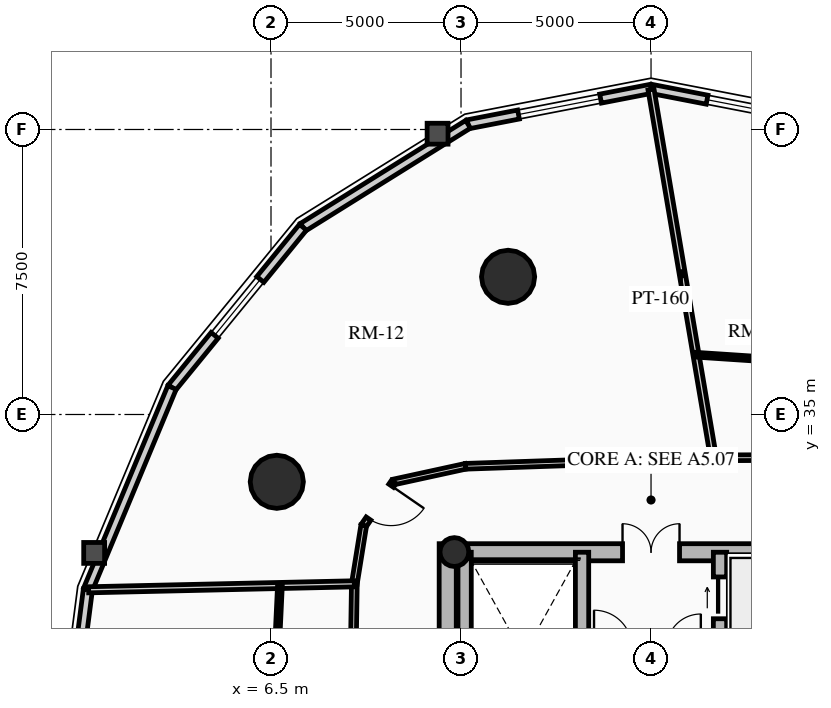
"""IFC4 building model, lengths in metres.
Left out: names, types, materials, properties, quantities, classifications, styles, units other than length and angle.
Written with IfcOpenShell. Run it as: python <this file> out.ifc"""

import sys

from ifc_helpers import new_model, si_unit, direction, frame, frame_2d, origin, origin_2d, place, context, subcontext, project, spatial, rectangle, circle, hollow_circle, extrude, source, transform, mapped, element, fill, save


model = new_model("IFC4")
c1 = context("Model", 3, precision=1e-05, world=origin(), true_north=direction((0.0, 1.0)))
c2 = subcontext(c1, "Body", "Model", "MODEL_VIEW")
j1 = project(units=[si_unit("LENGTHUNIT", "METRE"), si_unit("PLANEANGLEUNIT", "RADIAN")], contexts=[c1])
p1 = place(None, origin())
s1 = spatial("IfcSite", under=j1, at=p1, CompositionType="ELEMENT")
p2 = place(p1, origin())
s2 = spatial("IfcBuilding", under=s1, at=p2, CompositionType="ELEMENT")
p3 = place(p2, frame((0.0, 0.0, 107.98)))
s3 = spatial("IfcBuildingStorey", under=s2, at=p3, CompositionType="ELEMENT", Elevation=107.98)
p4 = place(p3, frame((11.15, 17.4, 0.0), z_axis=(0.0, 0.0, 1.0), x_axis=(0.0, 1.0, 0.0)))
e1 = element("IfcWall", 1, at=p4, inside=s3, PredefinedType="SHEAR", context=c2, shape_type="SweptSolid", body=[
    extrude(rectangle(XDim=14.2, YDim=0.45, at=frame_2d((7.1, 0.0))), origin(), (0.0, 0.0, 1.0), 2.91),
])
p5 = place(p3, frame((11.15, 31.375, 0.0), z_axis=(0.0, 0.0, 1.0), x_axis=(1.0, 0.0, 0.0)))
e2 = element("IfcWall", 2, at=p5, inside=s3, PredefinedType="SHEAR", context=c2, shape_type="SweptSolid", body=[
    extrude(rectangle(XDim=10.7, YDim=0.45, at=frame_2d((5.35, 0.0))), origin(), (0.0, 0.0, 1.0), 2.91),
])
m1 = source(origin(), c2, "Body", "SweptSolid", [
    extrude(rectangle(XDim=1.5, YDim=2.02, at=frame_2d((0.75, 1.01))), frame((0.0, 0.235, 0.0), z_axis=(0.0, -1.0, 0.0), x_axis=(1.0, 0.0, 0.0)), (0.0, 0.0, 1.0), 0.47),
])
p6 = place(p5, frame((4.6, 0.0, 0.0)))
e3 = element("IfcOpeningElement", 3, at=p6, cuts=e2, PredefinedType="OPENING", context=c2, shape_type="MappedRepresentation", body=[
    mapped(m1, transform((0.0, 0.0, 0.0), x_axis=(1.0, 0.0, 0.0), y_axis=(0.0, 1.0, 0.0), z_axis=(0.0, 0.0, 1.0), scale=1.0)),
])
p7 = place(p3, frame((14.685, 17.625, 0.0), z_axis=(0.0, 0.0, 1.0), x_axis=(0.0, 1.0, 0.0)))
e4 = element("IfcWall", 4, at=p7, inside=s3, PredefinedType="SHEAR", context=c2, shape_type="SweptSolid", body=[
    extrude(rectangle(XDim=13.75, YDim=0.35, at=frame_2d((6.875, 0.0))), origin(), (0.0, 0.0, 1.0), 2.91),
])
m2 = source(origin(), c2, "Body", "SweptSolid", [
    extrude(rectangle(XDim=1.1, YDim=2.015, at=frame_2d((0.55, 1.007))), frame((0.0, 0.185, 0.0), z_axis=(0.0, -1.0, 0.0), x_axis=(1.0, 0.0, 0.0)), (0.0, 0.0, 1.0), 0.37),
])
p8 = place(p7, frame((4.875, 0.0, 0.0)))
e5 = element("IfcOpeningElement", 5, at=p8, cuts=e4, PredefinedType="OPENING", context=c2, shape_type="MappedRepresentation", body=[
    mapped(m2, transform((0.0, 0.0, 0.0), x_axis=(1.0, 0.0, 0.0), y_axis=(0.0, 1.0, 0.0), z_axis=(0.0, 0.0, 1.0), scale=1.0)),
])
m3 = source(origin(), c2, "Body", "SweptSolid", [
    extrude(rectangle(XDim=1.15, YDim=2.02, at=frame_2d((0.575, 1.01))), frame((0.0, 0.185, 0.0), z_axis=(0.0, -1.0, 0.0), x_axis=(1.0, 0.0, 0.0)), (0.0, 0.0, 1.0), 0.37),
])
p9 = place(p7, frame((7.295, 0.0, 0.0)))
e6 = element("IfcOpeningElement", 6, at=p9, cuts=e4, PredefinedType="OPENING", context=c2, shape_type="MappedRepresentation", body=[
    mapped(m3, transform((0.0, 0.0, 0.0), x_axis=(1.0, 0.0, 0.0), y_axis=(0.0, 1.0, 0.0), z_axis=(0.0, 0.0, 1.0), scale=1.0)),
])
p10 = place(p3, frame((18.315, 17.625, 0.0), z_axis=(0.0, 0.0, 1.0), x_axis=(0.0, 1.0, 0.0)))
e7 = element("IfcWall", 7, at=p10, inside=s3, PredefinedType="SHEAR", context=c2, shape_type="SweptSolid", body=[
    extrude(rectangle(XDim=13.75, YDim=0.35, at=frame_2d((6.875, 0.0))), origin(), (0.0, 0.0, 1.0), 2.91),
])
p11 = place(p10, frame((10.0, 0.0, 0.0)))
e8 = element("IfcOpeningElement", 8, at=p11, cuts=e7, PredefinedType="OPENING", context=c2, shape_type="MappedRepresentation", body=[
    mapped(m2, transform((0.0, 0.0, 0.0), x_axis=(1.0, 0.0, 0.0), y_axis=(0.0, 1.0, 0.0), z_axis=(0.0, 0.0, 1.0), scale=1.0)),
])
p12 = place(p10, frame((12.0, 0.0, 0.0)))
e9 = element("IfcOpeningElement", 9, at=p12, cuts=e7, PredefinedType="OPENING", context=c2, shape_type="MappedRepresentation", body=[
    mapped(m2, transform((0.0, 0.0, 0.0), x_axis=(1.0, 0.0, 0.0), y_axis=(0.0, 1.0, 0.0), z_axis=(0.0, 0.0, 1.0), scale=1.0)),
])
p13 = place(p10, frame((5.305, 0.0, 0.0)))
e10 = element("IfcOpeningElement", 10, at=p13, cuts=e7, PredefinedType="OPENING", context=c2, shape_type="MappedRepresentation", body=[
    mapped(m3, transform((0.0, 0.0, 0.0), x_axis=(1.0, 0.0, 0.0), y_axis=(0.0, 1.0, 0.0), z_axis=(0.0, 0.0, 1.0), scale=1.0)),
])
p14 = place(p3, frame((11.595, 24.655, 0.0), z_axis=(0.0, 0.0, 1.0), x_axis=(0.0, 1.0, 0.0)))
e11 = element("IfcWall", 11, at=p14, inside=s3, PredefinedType="SHEAR", context=c2, shape_type="SweptSolid", body=[
    extrude(rectangle(XDim=6.72, YDim=0.35, at=frame_2d((3.36, 0.0))), origin(), (0.0, 0.0, 1.0), 2.91),
])
p15 = place(p3, frame((11.325, 31.38, 0.0), z_axis=(0.0, 0.0, 1.0), x_axis=(1.0, 0.0, 0.0)))
e12 = element("IfcColumn", 12, at=p15, inside=s3, PredefinedType="COLUMN", context=c2, shape_type="SweptSolid", body=[
    extrude(hollow_circle(Radius=0.38, WallThickness=0.032, at=origin_2d()), origin(), (0.0, 0.0, 1.0), 2.91),
])
for number, where, z_axis, x_axis in (
    (13, (12.739, 38.623, 0.0), (0.0, 0.0, 1.0), (1.0, 0.0, 0.0)),
    (14, (6.653, 33.229, 0.0), (0.0, 0.0, 1.0), (1.0, 0.0, 0.0)),
):
    element("IfcColumn", number, at=place(p3, frame(where, z_axis=z_axis, x_axis=x_axis)), inside=s3, PredefinedType="USERDEFINED", context=c2, shape_type="SweptSolid", body=[
        extrude(circle(Radius=0.7, at=origin_2d()), origin(), (0.0, 0.0, 1.0), 2.91),
    ])
p16 = place(p3, frame((16.5, 43.57, 0.0), z_axis=(0.0, 0.0, 1.0), x_axis=(0.981723785992, -0.190311344954, 0.0)))
e15 = element("IfcWall", 15, at=p16, inside=s3, PredefinedType="SOLIDWALL", context=c2, shape_type="SweptSolid", body=[
    extrude(rectangle(XDim=4.904, YDim=0.24, at=frame_2d((2.452, 0.0))), origin(), (0.0, 0.0, 1.0), 2.179),
])
m4 = source(origin(), c2, "Body", "SweptSolid", [
    extrude(rectangle(XDim=1.9, YDim=1.35, at=frame_2d((0.95, 0.675))), frame((0.0, 0.13, 0.0), z_axis=(0.0, -1.0, 0.0), x_axis=(1.0, 0.0, 0.0)), (0.0, 0.0, 1.0), 0.26),
])
p17 = place(p16, frame((1.502, 0.0, 0.65)))
e16 = element("IfcOpeningElement", 16, at=p17, cuts=e15, PredefinedType="OPENING", context=c2, shape_type="MappedRepresentation", body=[
    mapped(m4, transform((0.0, 0.0, 0.0), x_axis=(1.0, 0.0, 0.0), y_axis=(0.0, 1.0, 0.0), z_axis=(0.0, 0.0, 1.0), scale=1.0)),
])
p18 = place(p3, frame((11.685, 42.637, 0.0), z_axis=(0.0, 0.0, 1.0), x_axis=(0.981723785992, 0.190311344954, 0.0)))
e17 = element("IfcWall", 17, at=p18, inside=s3, PredefinedType="SOLIDWALL", context=c2, shape_type="SweptSolid", body=[
    extrude(rectangle(XDim=4.904, YDim=0.24, at=frame_2d((2.452, 0.0))), origin(), (0.0, 0.0, 1.0), 2.179),
])
m5 = source(origin(), c2, "Body", "SweptSolid", [
    extrude(rectangle(XDim=2.2, YDim=1.35, at=frame_2d((1.1, 0.675))), frame((0.0, 0.13, 0.0), z_axis=(0.0, -1.0, 0.0), x_axis=(1.0, 0.0, 0.0)), (0.0, 0.0, 1.0), 0.26),
])
p19 = place(p18, frame((1.352, 0.0, 0.65)))
e18 = element("IfcOpeningElement", 18, at=p19, cuts=e17, PredefinedType="OPENING", context=c2, shape_type="MappedRepresentation", body=[
    mapped(m5, transform((0.0, 0.0, 0.0), x_axis=(1.0, 0.0, 0.0), y_axis=(0.0, 1.0, 0.0), z_axis=(0.0, 0.0, 1.0), scale=1.0)),
])
p20 = place(p3, frame((7.342, 39.928, 0.0), z_axis=(0.0, 0.0, 1.0), x_axis=(0.848520380187, 0.529162701263, 0.0)))
e19 = element("IfcWall", 19, at=p20, inside=s3, PredefinedType="SOLIDWALL", context=c2, shape_type="SweptSolid", body=[
    extrude(rectangle(XDim=5.119, YDim=0.24, at=frame_2d((2.56, 0.0))), origin(), (0.0, 0.0, 1.0), 2.179),
])
p21 = place(p3, frame((3.895, 35.709, 0.0), z_axis=(0.0, 0.0, 1.0), x_axis=(0.632700781152, 0.77439635945, 0.0)))
e20 = element("IfcWall", 20, at=p21, inside=s3, PredefinedType="SOLIDWALL", context=c2, shape_type="SweptSolid", body=[
    extrude(rectangle(XDim=5.448, YDim=0.24, at=frame_2d((2.724, 0.0))), origin(), (0.0, 0.0, 1.0), 2.179),
])
p22 = place(p21, frame((1.774, 0.0, 0.65)))
e21 = element("IfcOpeningElement", 21, at=p22, cuts=e20, PredefinedType="OPENING", context=c2, shape_type="MappedRepresentation", body=[
    mapped(m4, transform((0.0, 0.0, 0.0), x_axis=(1.0, 0.0, 0.0), y_axis=(0.0, 1.0, 0.0), z_axis=(0.0, 0.0, 1.0), scale=1.0)),
])
p23 = place(p3, frame((1.682, 30.393, 0.0), z_axis=(0.0, 0.0, 1.0), x_axis=(0.384344417632, 0.923189779317, 0.0)))
e22 = element("IfcWall", 22, at=p23, inside=s3, PredefinedType="SOLIDWALL", context=c2, shape_type="SweptSolid", body=[
    extrude(rectangle(XDim=5.758, YDim=0.24, at=frame_2d((2.879, 0.0))), origin(), (0.0, 0.0, 1.0), 2.179),
])
p24 = place(p3, frame((0.919, 24.5, 0.0), z_axis=(0.0, 0.0, 1.0), x_axis=(0.128351991996, 0.991728675672, 0.0)))
e23 = element("IfcWall", 23, at=p24, inside=s3, PredefinedType="SOLIDWALL", context=c2, shape_type="SweptSolid", body=[
    extrude(rectangle(XDim=5.942, YDim=0.24, at=frame_2d((2.971, 0.0))), origin(), (0.0, 0.0, 1.0), 2.179),
])
p25 = place(p24, frame((2.021, 0.0, 0.65)))
e24 = element("IfcOpeningElement", 24, at=p25, cuts=e23, PredefinedType="OPENING", context=c2, shape_type="MappedRepresentation", body=[
    mapped(m4, transform((0.0, 0.0, 0.0), x_axis=(1.0, 0.0, 0.0), y_axis=(0.0, 1.0, 0.0), z_axis=(0.0, 0.0, 1.0), scale=1.0)),
])
p26 = place(p3, frame((21.527, 33.873, 0.0), z_axis=(0.0, 0.0, 1.0), x_axis=(-0.999991838845, -0.004040079574, 0.0)))
e25 = element("IfcWall", 25, at=p26, inside=s3, PredefinedType="PARTITIONING", context=c2, shape_type="SweptSolid", body=[
    extrude(rectangle(XDim=3.384, YDim=0.15, at=frame_2d((1.692, 0.0))), origin(), (0.0, 0.0, 1.0), 2.225),
])
p27 = place(p3, frame((18.143, 33.86, 0.0), z_axis=(0.0, 0.0, 1.0), x_axis=(-0.999419208319, -0.034077060363, 0.0)))
e26 = element("IfcWall", 26, at=p27, inside=s3, PredefinedType="PARTITIONING", context=c2, shape_type="SweptSolid", body=[
    extrude(rectangle(XDim=6.527, YDim=0.15, at=frame_2d((3.263, 0.0))), origin(), (0.0, 0.0, 1.0), 2.225),
])
p28 = place(p3, frame((11.62, 33.637, 0.0), z_axis=(0.0, 0.0, 1.0), x_axis=(-0.97702579435, -0.213121085711, 0.0)))
e27 = element("IfcWall", 27, at=p28, inside=s3, PredefinedType="PARTITIONING", context=c2, shape_type="SweptSolid", body=[
    extrude(rectangle(XDim=1.935, YDim=0.15, at=frame_2d((0.967, 0.0))), origin(), (0.0, 0.0, 1.0), 2.225),
])
p29 = place(p3, frame((9.729, 33.225, 0.0), z_axis=(0.0, 0.0, 1.0), x_axis=(-0.567183649484, -0.82359134755, 0.0)))
e28 = element("IfcWall", 28, at=p29, inside=s3, PredefinedType="PARTITIONING", context=c2, shape_type="SweptSolid", body=[
    extrude(rectangle(XDim=1.392, YDim=0.15, at=frame_2d((0.696, 0.0))), origin(), (0.0, 0.0, 1.0), 2.225),
])
m6 = source(origin(), c2, "Body", "SweptSolid", [
    extrude(rectangle(XDim=1.05, YDim=2.015, at=frame_2d((0.525, 1.007))), frame((0.0, 0.085, 0.0), z_axis=(0.0, -1.0, 0.0), x_axis=(1.0, 0.0, 0.0)), (0.0, 0.0, 1.0), 0.17),
])
p30 = place(p29, frame((0.12, 0.0, 0.0)))
e29 = element("IfcOpeningElement", 29, at=p30, cuts=e28, PredefinedType="OPENING", context=c2, shape_type="MappedRepresentation", body=[
    mapped(m6, transform((0.0, 0.0, 0.0), x_axis=(1.0, 0.0, 0.0), y_axis=(0.0, 1.0, 0.0), z_axis=(0.0, 0.0, 1.0), scale=1.0)),
])
p31 = place(p3, frame((8.94, 32.078, 0.0), z_axis=(0.0, 0.0, 1.0), x_axis=(-0.159148467753, -0.98725466077, 0.0)))
e30 = element("IfcWall", 30, at=p31, inside=s3, PredefinedType="PARTITIONING", context=c2, shape_type="SweptSolid", body=[
    extrude(rectangle(XDim=1.554, YDim=0.15, at=frame_2d((0.777, 0.0))), origin(), (0.0, 0.0, 1.0), 2.225),
])
p32 = place(p3, frame((8.693, 30.544, 0.0), z_axis=(0.0, 0.0, 1.0), x_axis=(-0.015307007986, -0.99988284089, 0.0)))
e31 = element("IfcWall", 31, at=p32, inside=s3, PredefinedType="PARTITIONING", context=c2, shape_type="SweptSolid", body=[
    extrude(rectangle(XDim=6.045, YDim=0.15, at=frame_2d((3.022, 0.0))), origin(), (0.0, 0.0, 1.0), 2.655),
])
p33 = place(p3, frame((18.143, 33.86, 0.0), z_axis=(0.0, 0.0, 1.0), x_axis=(-0.167145472003, 0.985932244725, 0.0)))
e32 = element("IfcWall", 32, at=p33, inside=s3, PredefinedType="PARTITIONING", context=c2, shape_type="SweptSolid", body=[
    extrude(rectangle(XDim=9.829, YDim=0.16, at=frame_2d((4.914, 0.0))), origin(), (0.0, 0.0, 1.0), 2.179),
])
p34 = place(p3, frame((8.693, 30.544, 0.0), z_axis=(0.0, 0.0, 1.0), x_axis=(-0.999746482141, -0.022516026432, 0.0)))
e33 = element("IfcWall", 33, at=p34, inside=s3, PredefinedType="PARTITIONING", context=c2, shape_type="SweptSolid", body=[
    extrude(rectangle(XDim=6.994, YDim=0.16, at=frame_2d((3.497, 0.0))), origin(), (0.0, 0.0, 1.0), 2.179),
])
p35 = place(p3, frame((21.466, 36.322, 0.0), z_axis=(0.0, 0.0, 1.0), x_axis=(-0.997806476515, 0.066198454847, 0.0)))
e34 = element("IfcWall", 34, at=p35, inside=s3, PredefinedType="PARTITIONING", context=c2, shape_type="SweptSolid", body=[
    extrude(rectangle(XDim=3.791, YDim=0.125, at=frame_2d((1.896, 0.0))), origin(), (0.0, 0.0, 1.0), 2.225),
])
p36 = place(p3, frame((6.735, 30.5, 0.0), z_axis=(0.0, 0.0, 1.0), x_axis=(-0.046620801603, -0.998912659274, 0.0)))
e35 = element("IfcWall", 35, at=p36, inside=s3, PredefinedType="PARTITIONING", context=c2, shape_type="SweptSolid", body=[
    extrude(rectangle(XDim=6.007, YDim=0.125, at=frame_2d((3.003, 0.0))), origin(), (0.0, 0.0, 1.0), 2.655),
])
m7 = source(origin(), c2, "Body", "SweptSolid", [
    extrude(rectangle(XDim=1.9, YDim=1.35, at=frame_2d((0.95, 0.675))), frame((0.0, 0.03, 0.0), z_axis=(0.0, -1.0, 0.0), x_axis=(1.0, 0.0, 0.0)), (0.0, 0.0, 1.0), 0.06),
])
p37 = place(p17, origin())
e36 = element("IfcWindow", 36, at=p37, inside=s3, PartitioningType="DOUBLE_PANEL_VERTICAL", PredefinedType="WINDOW", context=c2, shape_type="MappedRepresentation", body=[
    mapped(m7, transform((0.0, 0.0, 0.0), x_axis=(1.0, 0.0, 0.0), y_axis=(0.0, 1.0, 0.0), z_axis=(0.0, 0.0, 1.0), scale=1.0)),
])
fill(e16, e36)
m8 = source(origin(), c2, "Body", "SweptSolid", [
    extrude(rectangle(XDim=2.2, YDim=1.35, at=frame_2d((1.1, 0.675))), frame((0.0, 0.03, 0.0), z_axis=(0.0, -1.0, 0.0), x_axis=(1.0, 0.0, 0.0)), (0.0, 0.0, 1.0), 0.06),
])
p38 = place(p19, origin())
e37 = element("IfcWindow", 37, at=p38, inside=s3, PartitioningType="DOUBLE_PANEL_VERTICAL", PredefinedType="WINDOW", context=c2, shape_type="MappedRepresentation", body=[
    mapped(m8, transform((0.0, 0.0, 0.0), x_axis=(1.0, 0.0, 0.0), y_axis=(0.0, 1.0, 0.0), z_axis=(0.0, 0.0, 1.0), scale=1.0)),
])
fill(e18, e37)
p39 = place(p22, origin())
e38 = element("IfcWindow", 38, at=p39, inside=s3, PartitioningType="DOUBLE_PANEL_VERTICAL", PredefinedType="WINDOW", context=c2, shape_type="MappedRepresentation", body=[
    mapped(m7, transform((0.0, 0.0, 0.0), x_axis=(1.0, 0.0, 0.0), y_axis=(0.0, 1.0, 0.0), z_axis=(0.0, 0.0, 1.0), scale=1.0)),
])
fill(e21, e38)
m9 = source(origin(), c2, "Body", "SweptSolid", [
    extrude(rectangle(XDim=1.1, YDim=2.015, at=frame_2d((0.55, 1.007))), frame((0.0, 0.025, 0.0), z_axis=(0.0, -1.0, 0.0), x_axis=(1.0, 0.0, 0.0)), (0.0, 0.0, 1.0), 0.05),
])
p40 = place(p12, origin())
e39 = element("IfcDoor", 39, at=p40, inside=s3, OperationType="SLIDING_TO_RIGHT", PredefinedType="DOOR", context=c2, shape_type="MappedRepresentation", body=[
    mapped(m9, transform((0.0, 0.0, 0.0), x_axis=(1.0, 0.0, 0.0), y_axis=(0.0, 1.0, 0.0), z_axis=(0.0, 0.0, 1.0), scale=1.0)),
])
fill(e9, e39)
m10 = source(origin(), c2, "Body", "SweptSolid", [
    extrude(rectangle(XDim=1.5, YDim=2.02, at=frame_2d((0.75, 1.01))), frame((0.0, 0.025, 0.0), z_axis=(0.0, -1.0, 0.0), x_axis=(1.0, 0.0, 0.0)), (0.0, 0.0, 1.0), 0.05),
])
p41 = place(p6, origin())
e40 = element("IfcDoor", 40, at=p41, inside=s3, OperationType="DOUBLE_DOOR_SINGLE_SWING", PredefinedType="DOOR", context=c2, shape_type="MappedRepresentation", body=[
    mapped(m10, transform((0.0, 0.0, 0.0), x_axis=(1.0, 0.0, 0.0), y_axis=(0.0, 1.0, 0.0), z_axis=(0.0, 0.0, 1.0), scale=1.0)),
])
fill(e3, e40)
m11 = source(origin(), c2, "Body", "SweptSolid", [
    extrude(rectangle(XDim=1.05, YDim=2.015, at=frame_2d((0.525, 1.007))), frame((0.0, 0.025, 0.0), z_axis=(0.0, -1.0, 0.0), x_axis=(1.0, 0.0, 0.0)), (0.0, 0.0, 1.0), 0.05),
])
p42 = place(p30, origin())
e41 = element("IfcDoor", 41, at=p42, inside=s3, OperationType="SINGLE_SWING_LEFT", PredefinedType="DOOR", context=c2, shape_type="MappedRepresentation", body=[
    mapped(m11, transform((0.0, 0.0, 0.0), x_axis=(1.0, 0.0, 0.0), y_axis=(0.0, 1.0, 0.0), z_axis=(0.0, 0.0, 1.0), scale=1.0)),
])
fill(e29, e41)
save(model, sys.argv[1])
